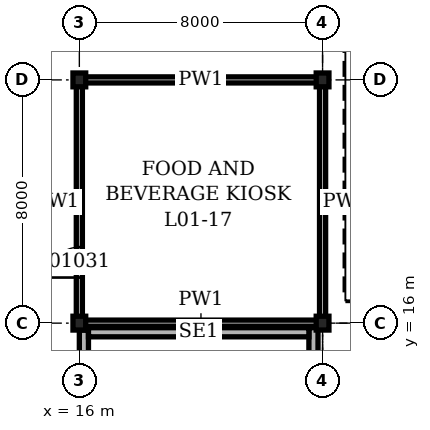
"""IFC4 building model, lengths in metres.
Left out: names, types, materials, properties, quantities, classifications, styles, units other than length and angle.
Written with IfcOpenShell. Run it as: python <this file> out.ifc"""

import sys

from ifc_helpers import new_model, si_unit, direction, frame, frame_2d, origin, origin_2d, place, context, subcontext, project, spatial, rectangle, i_section, extrude, element, fill, save


model = new_model("IFC4")
c1 = context("Model", 3, precision=1e-05, world=origin(), true_north=direction((0.0, 1.0)))
c2 = subcontext(c1, "Body", "Model", "MODEL_VIEW")
j1 = project(units=[si_unit("LENGTHUNIT", "METRE"), si_unit("PLANEANGLEUNIT", "RADIAN")], contexts=[c1])
p1 = place(None, origin())
s1 = spatial("IfcSite", under=j1, at=p1, CompositionType="ELEMENT")
p2 = place(p1, origin())
s2 = spatial("IfcBuilding", under=s1, at=p2, CompositionType="ELEMENT")
p3 = place(p2, frame((0.0, 0.0, 4.9)))
s3 = spatial("IfcBuildingStorey", under=s2, at=p3, CompositionType="ELEMENT", Elevation=4.9)
for number, where, z_axis, x_axis in (
    (1, (16.0, 16.0, 0.0), (0.0, 0.0, 1.0), (1.0, 0.0, 0.0)),
    (2, (16.0, 24.0, 0.0), (0.0, 0.0, 1.0), (1.0, 0.0, 0.0)),
    (3, (24.0, 16.0, 0.0), (0.0, 0.0, 1.0), (1.0, 0.0, 0.0)),
    (4, (24.0, 24.0, 0.0), (0.0, 0.0, 1.0), (1.0, 0.0, 0.0)),
):
    element("IfcColumn", number, at=place(p3, frame(where, z_axis=z_axis, x_axis=x_axis)), inside=s3, PredefinedType="COLUMN", context=c2, shape_type="SweptSolid", body=[
        extrude(i_section(OverallWidth=0.419, OverallDepth=0.455, WebThickness=0.042, FlangeThickness=0.068, at=origin_2d()), origin(), (0.0, 0.0, 1.0), 5.0),
    ])
p4 = place(p3, frame((16.15, 5.0, 0.0), z_axis=(0.0, 0.0, 1.0), x_axis=(0.0, 1.0, 0.0)))
e5 = element("IfcWall", 5, at=p4, inside=s3, PredefinedType="SOLIDWALL", context=c2, shape_type="SweptSolid", body=[
    extrude(rectangle(XDim=10.773, YDim=0.3, at=frame_2d((5.386, 0.0))), origin(), (0.0, 0.0, 1.0), 4.8),
])
p5 = place(p3, frame((23.7, 5.0, 0.0), z_axis=(0.0, 0.0, 1.0), x_axis=(0.0, 1.0, 0.0)))
e6 = element("IfcWall", 6, at=p5, inside=s3, PredefinedType="SOLIDWALL", context=c2, shape_type="SweptSolid", body=[
    extrude(rectangle(XDim=10.85, YDim=0.3, at=frame_2d((5.425, 0.0))), origin(), (0.0, 0.0, 1.0), 4.8),
])
p6 = place(p3, frame((16.3, 15.7, 0.0), z_axis=(0.0, 0.0, 1.0), x_axis=(1.0, 0.0, 0.0)))
e7 = element("IfcWall", 7, at=p6, inside=s3, PredefinedType="SOLIDWALL", context=c2, shape_type="SweptSolid", body=[
    extrude(rectangle(XDim=7.25, YDim=0.3, at=frame_2d((3.625, 0.0))), origin(), (0.0, 0.0, 1.0), 4.8),
])
for number, where, z_axis, x_axis in (
    (8, (16.1, 16.0, 0.0), (0.0, 0.0, 1.0), (1.0, 0.0, 0.0)),
    (9, (16.1, 24.0, 0.0), (0.0, 0.0, 1.0), (1.0, 0.0, 0.0)),
):
    element("IfcWall", number, at=place(p3, frame(where, z_axis=z_axis, x_axis=x_axis)), inside=s3, PredefinedType="PARTITIONING", context=c2, shape_type="SweptSolid", body=[
        extrude(rectangle(XDim=7.8, YDim=0.2, at=frame_2d((3.9, 0.0))), origin(), (0.0, 0.0, 1.0), 4.028),
    ])
p7 = place(p3, frame((16.0, 16.1, 0.0), z_axis=(0.0, 0.0, 1.0), x_axis=(0.0, 1.0, 0.0)))
e10 = element("IfcWall", 10, at=p7, inside=s3, PredefinedType="PARTITIONING", context=c2, shape_type="SweptSolid", body=[
    extrude(rectangle(XDim=7.8, YDim=0.2, at=frame_2d((3.9, 0.0))), origin(), (0.0, 0.0, 1.0), 4.028),
])
p8 = place(p7, frame((1.4, 0.0, 0.0)))
e11 = element("IfcOpeningElement", 11, at=p8, cuts=e10, PredefinedType="OPENING", context=c2, shape_type="SweptSolid", body=[
    extrude(rectangle(XDim=1.0, YDim=2.1, at=frame_2d((0.5, 1.05))), frame((0.0, 0.11, 0.0), z_axis=(0.0, -1.0, 0.0), x_axis=(1.0, 0.0, 0.0)), (0.0, 0.0, 1.0), 0.22),
])
p9 = place(p3, frame((24.0, 16.1, 0.0), z_axis=(0.0, 0.0, 1.0), x_axis=(0.0, 1.0, 0.0)))
e12 = element("IfcWall", 12, at=p9, inside=s3, PredefinedType="PARTITIONING", context=c2, shape_type="SweptSolid", body=[
    extrude(rectangle(XDim=7.8, YDim=0.2, at=frame_2d((3.9, 0.0))), origin(), (0.0, 0.0, 1.0), 4.028),
])
p10 = place(p8, origin())
e13 = element("IfcDoor", 13, at=p10, inside=s3, OperationType="SINGLE_SWING_LEFT", PredefinedType="DOOR", context=c2, shape_type="SweptSolid", body=[
    extrude(rectangle(XDim=1.0, YDim=2.1, at=frame_2d((0.5, 1.05))), frame((0.0, 0.1, 0.0), z_axis=(0.0, -1.0, 0.0), x_axis=(1.0, 0.0, 0.0)), (0.0, 0.0, 1.0), 0.199),
])
fill(e11, e13)
save(model, sys.argv[1])
